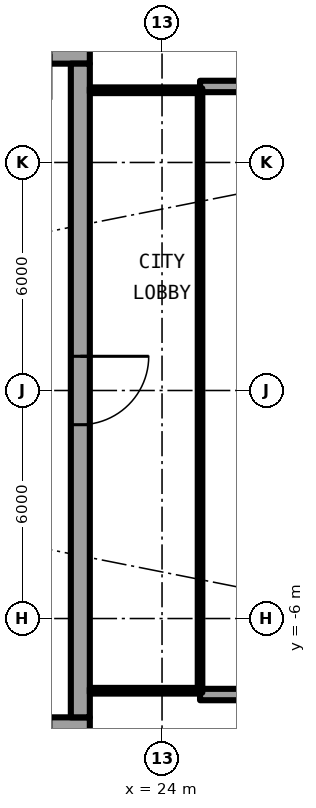
"""IFC4 building model, lengths in metres.
Left out: names, types, materials, properties, quantities, classifications, styles, units other than length and angle.
Written with IfcOpenShell. Run it as: python <this file> out.ifc"""

import sys

from ifc_helpers import new_model, si_unit, direction, frame, frame_2d, origin, place, context, subcontext, project, spatial, rectangle, extrude, element, fill, save


model = new_model("IFC4")
c1 = context("Model", 3, precision=1e-05, world=origin(), true_north=direction((0.0, 1.0)))
c2 = subcontext(c1, "Body", "Model", "MODEL_VIEW")
j1 = project(units=[si_unit("LENGTHUNIT", "METRE"), si_unit("PLANEANGLEUNIT", "RADIAN")], contexts=[c1])
p1 = place(None, origin())
s1 = spatial("IfcSite", under=j1, at=p1, CompositionType="ELEMENT")
p2 = place(p1, origin())
s2 = spatial("IfcBuilding", under=s1, at=p2, CompositionType="ELEMENT")
p3 = place(p2, frame((0.0, 0.0, 154.35)))
s3 = spatial("IfcBuildingStorey", under=s2, at=p3, CompositionType="ELEMENT", Elevation=154.35)
for number, where, z_axis, x_axis in (
    (1, (25.0, 8.0, 0.0), (0.0, 0.0, 1.0), (1.0, 0.0, 0.0)),
    (2, (25.0, -8.0, 0.0), (0.0, 0.0, 1.0), (1.0, 0.0, 0.0)),
):
    element("IfcWall", number, at=place(p3, frame(where, z_axis=z_axis, x_axis=x_axis)), inside=s3, PredefinedType="SOLIDWALL", context=c2, shape_type="SweptSolid", body=[
        extrude(rectangle(XDim=2.667, YDim=0.3, at=frame_2d((1.333, 0.0))), origin(), (0.0, 0.0, 1.0), 2.7),
    ])
p4 = place(p3, frame((22.1, 8.85, 0.0), z_axis=(0.0, 0.0, 1.0), x_axis=(-1.0, 0.0, 0.0)))
e3 = element("IfcWall", 3, at=p4, inside=s3, PredefinedType="SHEAR", context=c2, shape_type="SweptSolid", body=[
    extrude(rectangle(XDim=13.6, YDim=0.5, at=frame_2d((6.8, 0.0))), origin(), (0.0, 0.0, 1.0), 3.05),
])
p5 = place(p4, frame((1.025, 0.0, 0.0)))
e4 = element("IfcOpeningElement", 4, at=p5, cuts=e3, PredefinedType="OPENING", context=c2, shape_type="SweptSolid", body=[
    extrude(rectangle(XDim=1.2, YDim=2.3, at=frame_2d((0.6, 1.15))), frame((0.0, 0.26, 0.0), z_axis=(0.0, -1.0, 0.0), x_axis=(1.0, 0.0, 0.0)), (0.0, 0.0, 1.0), 0.52),
])
p6 = place(p3, frame((8.5, -8.85, 0.0), z_axis=(0.0, 0.0, 1.0), x_axis=(1.0, 0.0, 0.0)))
e5 = element("IfcWall", 5, at=p6, inside=s3, PredefinedType="SHEAR", context=c2, shape_type="SweptSolid", body=[
    extrude(rectangle(XDim=13.6, YDim=0.5, at=frame_2d((6.8, 0.0))), origin(), (0.0, 0.0, 1.0), 3.05),
])
p7 = place(p6, frame((11.375, 0.0, 0.0)))
e6 = element("IfcOpeningElement", 6, at=p7, cuts=e5, PredefinedType="OPENING", context=c2, shape_type="SweptSolid", body=[
    extrude(rectangle(XDim=1.2, YDim=2.3, at=frame_2d((0.6, 1.15))), frame((0.0, 0.26, 0.0), z_axis=(0.0, -1.0, 0.0), x_axis=(1.0, 0.0, 0.0)), (0.0, 0.0, 1.0), 0.52),
])
p8 = place(p3, frame((21.85, 8.6, 0.0), z_axis=(0.0, 0.0, 1.0), x_axis=(0.0, -1.0, 0.0)))
e7 = element("IfcWall", 7, at=p8, inside=s3, PredefinedType="SHEAR", context=c2, shape_type="SweptSolid", body=[
    extrude(rectangle(XDim=17.2, YDim=0.5, at=frame_2d((8.6, 0.0))), origin(), (0.0, 0.0, 1.0), 3.05),
])
p9 = place(p8, frame((7.7, 0.0, 0.0)))
e8 = element("IfcOpeningElement", 8, at=p9, cuts=e7, PredefinedType="OPENING", context=c2, shape_type="SweptSolid", body=[
    extrude(rectangle(XDim=1.8, YDim=2.3, at=frame_2d((0.9, 1.15))), frame((0.0, 0.26, 0.0), z_axis=(0.0, -1.0, 0.0), x_axis=(1.0, 0.0, 0.0)), (0.0, 0.0, 1.0), 0.52),
])
for number, where, z_axis, x_axis in (
    (9, (22.1, -7.9, 0.0), (0.0, 0.0, 1.0), (1.0, 0.0, 0.0)),
    (10, (22.1, 7.9, 0.0), (0.0, 0.0, 1.0), (1.0, 0.0, 0.0)),
):
    element("IfcWall", number, at=place(p3, frame(where, z_axis=z_axis, x_axis=x_axis)), inside=s3, PredefinedType="PARTITIONING", context=c2, shape_type="SweptSolid", body=[
        extrude(rectangle(XDim=2.84, YDim=0.15, at=frame_2d((1.42, 0.0))), origin(), (0.0, 0.0, 1.0), 2.7),
    ])
p10 = place(p3, frame((25.0, -7.95, 0.0), z_axis=(0.0, 0.0, 1.0), x_axis=(0.0, 1.0, 0.0)))
e11 = element("IfcWall", 11, at=p10, inside=s3, PredefinedType="PARTITIONING", context=c2, shape_type="SweptSolid", body=[
    extrude(rectangle(XDim=15.9, YDim=0.12, at=frame_2d((7.95, 0.0))), origin(), (0.0, 0.0, 1.0), 2.7),
])
p11 = place(p10, frame((0.95, 0.0, 0.1)))
e12 = element("IfcOpeningElement", 12, at=p11, cuts=e11, PredefinedType="OPENING", context=c2, shape_type="SweptSolid", body=[
    extrude(rectangle(XDim=14.0, YDim=2.35, at=frame_2d((7.0, 1.175))), frame((0.0, 0.07, 0.0), z_axis=(0.0, -1.0, 0.0), x_axis=(1.0, 0.0, 0.0)), (0.0, 0.0, 1.0), 0.14),
])
p12 = place(p9, origin())
e13 = element("IfcDoor", 13, at=p12, inside=s3, OperationType="SINGLE_SWING_LEFT", PredefinedType="DOOR", context=c2, shape_type="SweptSolid", body=[
    extrude(rectangle(XDim=1.8, YDim=2.3, at=frame_2d((0.9, 1.15))), frame((0.0, 0.025, 0.0), z_axis=(0.0, -1.0, 0.0), x_axis=(1.0, 0.0, 0.0)), (0.0, 0.0, 1.0), 0.05),
])
fill(e8, e13)
p13 = place(p11, origin())
e14 = element("IfcWindow", 14, at=p13, inside=s3, PartitioningType="SINGLE_PANEL", PredefinedType="WINDOW", context=c2, shape_type="SweptSolid", body=[
    extrude(rectangle(XDim=14.0, YDim=2.35, at=frame_2d((7.0, 1.175))), frame((0.0, 0.03, 0.0), z_axis=(0.0, -1.0, 0.0), x_axis=(1.0, 0.0, 0.0)), (0.0, 0.0, 1.0), 0.06),
])
fill(e12, e14)
save(model, sys.argv[1])
